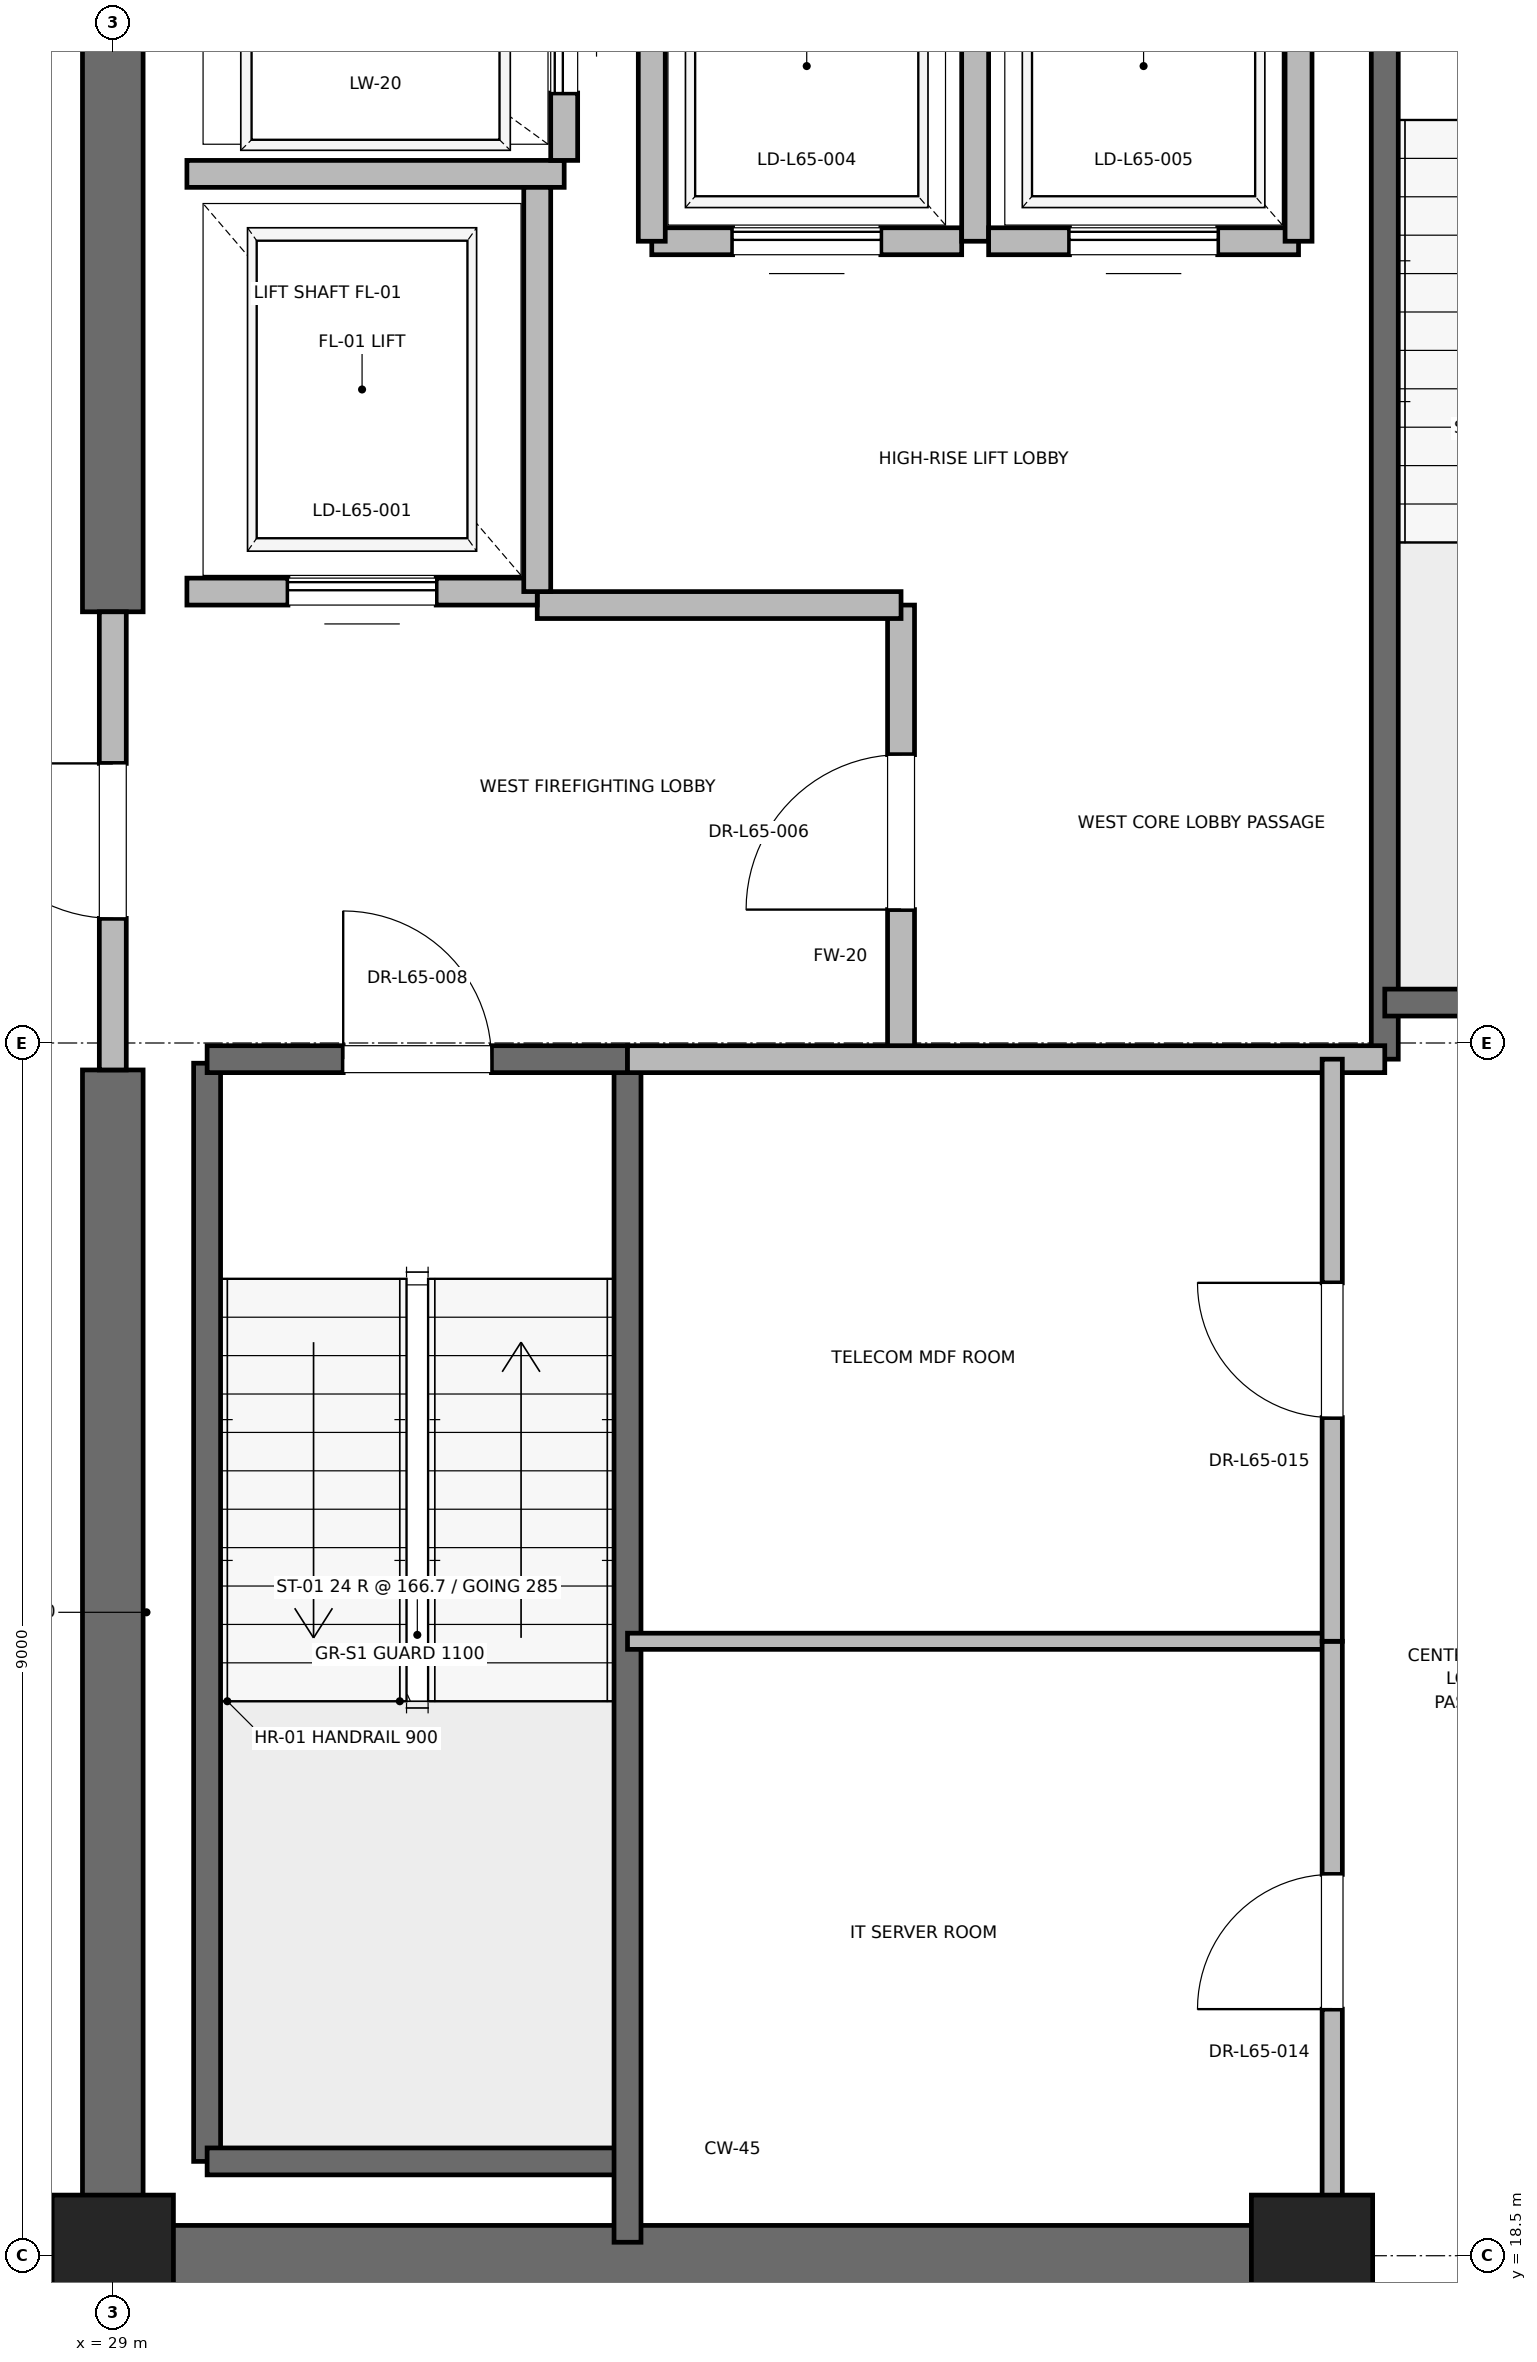
"""IFC4 building model, lengths in metres.
Left out: names, types, materials, properties, quantities, classifications, styles, units other than length and angle.
Written with IfcOpenShell. Run it as: python <this file> out.ifc"""

import sys

from ifc_helpers import new_model, si_unit, direction, frame, frame_2d, origin, origin_2d, place, context, subcontext, project, spatial, rectangle, extrude, element, fill, save


model = new_model("IFC4")
c1 = context("Model", 3, precision=1e-05, world=origin(), true_north=direction((0.0, 1.0)))
c2 = subcontext(c1, "Body", "Model", "MODEL_VIEW")
j1 = project(units=[si_unit("LENGTHUNIT", "METRE"), si_unit("PLANEANGLEUNIT", "RADIAN")], contexts=[c1])
p1 = place(None, origin())
s1 = spatial("IfcSite", under=j1, at=p1, CompositionType="ELEMENT")
p2 = place(p1, origin())
s2 = spatial("IfcBuilding", under=s1, at=p2, CompositionType="ELEMENT")
p3 = place(p2, frame((0.0, 0.0, 279.2)))
s3 = spatial("IfcBuildingStorey", under=s2, at=p3, CompositionType="ELEMENT", Elevation=279.2)
for number, where, z_axis, x_axis in (
    (1, (29.0, 18.5, 0.0), (0.0, 0.0, 1.0), (1.0, 0.0, 0.0)),
    (2, (37.9, 18.5, 0.0), (0.0, 0.0, 1.0), (1.0, 0.0, 0.0)),
):
    element("IfcColumn", number, at=place(p3, frame(where, z_axis=z_axis, x_axis=x_axis)), inside=s3, PredefinedType="PILASTER", context=c2, shape_type="SweptSolid", body=[
        extrude(rectangle(XDim=0.9, YDim=0.9, at=origin_2d()), origin(), (0.0, 0.0, 1.0), 4.0),
    ])
p4 = place(p3, frame((29.0, 18.5, 0.0), z_axis=(0.0, 0.0, 1.0), x_axis=(1.0, 0.0, 0.0)))
e3 = element("IfcWall", 3, at=p4, inside=s3, PredefinedType="SHEAR", context=c2, shape_type="SweptSolid", body=[
    extrude(rectangle(XDim=9.2, YDim=0.45, at=frame_2d((4.6, 0.0))), origin(), (0.0, 0.0, 1.0), 3.785),
])
p5 = place(p3, frame((29.0, 18.5, 0.0), z_axis=(0.0, 0.0, 1.0), x_axis=(0.0, 1.0, 0.0)))
e4 = element("IfcWall", 4, at=p5, inside=s3, PredefinedType="SHEAR", context=c2, shape_type="SweptSolid", body=[
    extrude(rectangle(XDim=8.8, YDim=0.45, at=frame_2d((4.4, 0.0))), origin(), (0.0, 0.0, 1.0), 3.785),
])
p6 = place(p3, frame((29.0, 30.7, 0.0), z_axis=(0.0, 0.0, 1.0), x_axis=(0.0, 1.0, 0.0)))
e5 = element("IfcWall", 5, at=p6, inside=s3, PredefinedType="SHEAR", context=c2, shape_type="SweptSolid", body=[
    extrude(rectangle(XDim=5.8, YDim=0.45, at=frame_2d((2.9, 0.0))), origin(), (0.0, 0.0, 1.0), 3.785),
])
p7 = place(p3, frame((29.7, 19.2, 0.0), z_axis=(0.0, 0.0, 1.0), x_axis=(0.0, 1.0, 0.0)))
e6 = element("IfcWall", 6, at=p7, inside=s3, PredefinedType="SOLIDWALL", context=c2, shape_type="SweptSolid", body=[
    extrude(rectangle(XDim=8.15, YDim=0.2, at=frame_2d((4.075, 0.0))), origin(), (0.0, 0.0, 1.0), 3.785),
])
p8 = place(p3, frame((29.7, 19.2, 0.0), z_axis=(0.0, 0.0, 1.0), x_axis=(1.0, 0.0, 0.0)))
e7 = element("IfcWall", 7, at=p8, inside=s3, PredefinedType="SOLIDWALL", context=c2, shape_type="SweptSolid", body=[
    extrude(rectangle(XDim=3.12, YDim=0.2, at=frame_2d((1.56, 0.0))), origin(), (0.0, 0.0, 1.0), 3.785),
])
p9 = place(p3, frame((32.82, 18.6, 0.0), z_axis=(0.0, 0.0, 1.0), x_axis=(0.0, 1.0, 0.0)))
e8 = element("IfcWall", 8, at=p9, inside=s3, PredefinedType="SOLIDWALL", context=c2, shape_type="SweptSolid", body=[
    extrude(rectangle(XDim=8.78, YDim=0.2, at=frame_2d((4.39, 0.0))), origin(), (0.0, 0.0, 1.0), 3.785),
])
p10 = place(p3, frame((29.7, 27.38, 0.0), z_axis=(0.0, 0.0, 1.0), x_axis=(1.0, 0.0, 0.0)))
e9 = element("IfcWall", 9, at=p10, inside=s3, PredefinedType="SOLIDWALL", context=c2, shape_type="SweptSolid", body=[
    extrude(rectangle(XDim=3.12, YDim=0.2, at=frame_2d((1.56, 0.0))), origin(), (0.0, 0.0, 1.0), 3.785),
])
p11 = place(p10, frame((1.01, 0.0, 0.0)))
e10 = element("IfcOpeningElement", 10, at=p11, cuts=e9, PredefinedType="OPENING", context=c2, shape_type="SweptSolid", body=[
    extrude(rectangle(XDim=1.1, YDim=2.15, at=frame_2d((0.55, 1.075))), frame((0.0, 0.1, 0.0), z_axis=(0.0, -1.0, 0.0), x_axis=(1.0, 0.0, 0.0)), (0.0, 0.0, 1.0), 0.2),
])
p12 = place(p3, frame((38.44, 27.38, 0.0), z_axis=(0.0, 0.0, 1.0), x_axis=(0.0, 1.0, 0.0)))
e11 = element("IfcWall", 11, at=p12, inside=s3, PredefinedType="SOLIDWALL", context=c2, shape_type="SweptSolid", body=[
    extrude(rectangle(XDim=8.87, YDim=0.2, at=frame_2d((4.435, 0.0))), origin(), (0.0, 0.0, 1.0), 3.785),
])
p13 = place(p3, frame((38.44, 27.8, 0.0), z_axis=(0.0, 0.0, 1.0), x_axis=(1.0, 0.0, 0.0)))
e12 = element("IfcWall", 12, at=p13, inside=s3, PredefinedType="SOLIDWALL", context=c2, shape_type="SweptSolid", body=[
    extrude(rectangle(XDim=3.32, YDim=0.2, at=frame_2d((1.66, 0.0))), origin(), (0.0, 0.0, 1.0), 3.785),
])
p14 = place(p3, frame((34.85, 27.38, 0.0), z_axis=(0.0, 0.0, 1.0), x_axis=(0.0, 1.0, 0.0)))
e13 = element("IfcWall", 13, at=p14, inside=s3, PredefinedType="PARTITIONING", context=c2, shape_type="SweptSolid", body=[
    extrude(rectangle(XDim=3.37, YDim=0.2, at=frame_2d((1.685, 0.0))), origin(), (0.0, 0.0, 1.0), 3.785),
])
p15 = place(p14, frame((1.11, 0.0, 0.0)))
e14 = element("IfcOpeningElement", 14, at=p15, cuts=e13, PredefinedType="OPENING", context=c2, shape_type="SweptSolid", body=[
    extrude(rectangle(XDim=1.15, YDim=2.2, at=frame_2d((0.575, 1.1))), frame((0.0, 0.1, 0.0), z_axis=(0.0, -1.0, 0.0), x_axis=(1.0, 0.0, 0.0)), (0.0, 0.0, 1.0), 0.2),
])
p16 = place(p3, frame((29.0, 27.3, 0.0), z_axis=(0.0, 0.0, 1.0), x_axis=(0.0, 1.0, 0.0)))
e15 = element("IfcWall", 15, at=p16, inside=s3, PredefinedType="PARTITIONING", context=c2, shape_type="SweptSolid", body=[
    extrude(rectangle(XDim=3.4, YDim=0.2, at=frame_2d((1.7, 0.0))), origin(), (0.0, 0.0, 1.0), 2.865),
])
p17 = place(p16, frame((1.125, 0.0, 0.0)))
e16 = element("IfcOpeningElement", 16, at=p17, cuts=e15, PredefinedType="OPENING", context=c2, shape_type="SweptSolid", body=[
    extrude(rectangle(XDim=1.15, YDim=2.2, at=frame_2d((0.575, 1.1))), frame((0.0, 0.1, 0.0), z_axis=(0.0, -1.0, 0.0), x_axis=(1.0, 0.0, 0.0)), (0.0, 0.0, 1.0), 0.2),
])
p18 = place(p3, frame((32.82, 27.38, 0.0), z_axis=(0.0, 0.0, 1.0), x_axis=(1.0, 0.0, 0.0)))
e17 = element("IfcWall", 17, at=p18, inside=s3, PredefinedType="PARTITIONING", context=c2, shape_type="SweptSolid", body=[
    extrude(rectangle(XDim=5.62, YDim=0.2, at=frame_2d((2.81, 0.0))), origin(), (0.0, 0.0, 1.0), 3.785),
])
p19 = place(p3, frame((32.15, 30.75, 0.0), z_axis=(0.0, 0.0, 1.0), x_axis=(1.0, 0.0, 0.0)))
e18 = element("IfcWall", 18, at=p19, inside=s3, PredefinedType="PARTITIONING", context=c2, shape_type="SweptSolid", body=[
    extrude(rectangle(XDim=2.7, YDim=0.2, at=frame_2d((1.35, 0.0))), origin(), (0.0, 0.0, 1.0), 3.785),
])
p20 = place(p3, frame((29.55, 30.85, 0.0), z_axis=(0.0, 0.0, 1.0), x_axis=(1.0, 0.0, 0.0)))
e19 = element("IfcWall", 19, at=p20, inside=s3, PredefinedType="SOLIDWALL", context=c2, shape_type="SweptSolid", body=[
    extrude(rectangle(XDim=2.6, YDim=0.2, at=frame_2d((1.3, 0.0))), origin(), (0.0, 0.0, 1.0), 2.865),
])
p21 = place(p20, frame((0.75, 0.0, 0.0)))
e20 = element("IfcOpeningElement", 20, at=p21, cuts=e19, PredefinedType="OPENING", context=c2, shape_type="SweptSolid", body=[
    extrude(rectangle(XDim=1.1, YDim=2.2, at=frame_2d((0.55, 1.1))), frame((0.0, 0.1, 0.0), z_axis=(0.0, -1.0, 0.0), x_axis=(1.0, 0.0, 0.0)), (0.0, 0.0, 1.0), 0.2),
])
p22 = place(p3, frame((29.55, 33.95, 0.0), z_axis=(0.0, 0.0, 1.0), x_axis=(1.0, 0.0, 0.0)))
e21 = element("IfcWall", 21, at=p22, inside=s3, PredefinedType="SOLIDWALL", context=c2, shape_type="SweptSolid", body=[
    extrude(rectangle(XDim=2.8, YDim=0.2, at=frame_2d((1.4, 0.0))), origin(), (0.0, 0.0, 1.0), 3.785),
])
p23 = place(p3, frame((32.15, 30.85, 0.0), z_axis=(0.0, 0.0, 1.0), x_axis=(0.0, 1.0, 0.0)))
e22 = element("IfcWall", 22, at=p23, inside=s3, PredefinedType="SOLIDWALL", context=c2, shape_type="SweptSolid", body=[
    extrude(rectangle(XDim=3.0, YDim=0.2, at=frame_2d((1.5, 0.0))), origin(), (0.0, 0.0, 1.0), 3.785),
])
p24 = place(p3, frame((32.35, 34.05, 0.0), z_axis=(0.0, 0.0, 1.0), x_axis=(0.0, 1.0, 0.0)))
e23 = element("IfcWall", 23, at=p24, inside=s3, PredefinedType="SOLIDWALL", context=c2, shape_type="SweptSolid", body=[
    extrude(rectangle(XDim=2.1, YDim=0.2, at=frame_2d((1.05, 0.0))), origin(), (0.0, 0.0, 1.0), 3.785),
])
p25 = place(p24, frame((0.5, 0.0, 0.0)))
e24 = element("IfcOpeningElement", 24, at=p25, cuts=e23, PredefinedType="OPENING", context=c2, shape_type="SweptSolid", body=[
    extrude(rectangle(XDim=1.1, YDim=2.2, at=frame_2d((0.55, 1.1))), frame((0.0, 0.1, 0.0), z_axis=(0.0, -1.0, 0.0), x_axis=(1.0, 0.0, 0.0)), (0.0, 0.0, 1.0), 0.2),
])
p26 = place(p3, frame((33.0, 33.45, 0.0), z_axis=(0.0, 0.0, 1.0), x_axis=(1.0, 0.0, 0.0)))
e25 = element("IfcWall", 25, at=p26, inside=s3, PredefinedType="SOLIDWALL", context=c2, shape_type="SweptSolid", body=[
    extrude(rectangle(XDim=2.3, YDim=0.2, at=frame_2d((1.15, 0.0))), origin(), (0.0, 0.0, 1.0), 3.785),
])
p27 = place(p26, frame((0.6, 0.0, 0.0)))
e26 = element("IfcOpeningElement", 26, at=p27, cuts=e25, PredefinedType="OPENING", context=c2, shape_type="SweptSolid", body=[
    extrude(rectangle(XDim=1.1, YDim=2.2, at=frame_2d((0.55, 1.1))), frame((0.0, 0.1, 0.0), z_axis=(0.0, -1.0, 0.0), x_axis=(1.0, 0.0, 0.0)), (0.0, 0.0, 1.0), 0.2),
])
p28 = place(p3, frame((33.0, 36.05, 0.0), z_axis=(0.0, 0.0, 1.0), x_axis=(0.0, -1.0, 0.0)))
e27 = element("IfcWall", 27, at=p28, inside=s3, PredefinedType="SOLIDWALL", context=c2, shape_type="SweptSolid", body=[
    extrude(rectangle(XDim=2.6, YDim=0.2, at=frame_2d((1.3, 0.0))), origin(), (0.0, 0.0, 1.0), 3.785),
])
p29 = place(p3, frame((35.4, 33.45, 0.0), z_axis=(0.0, 0.0, 1.0), x_axis=(0.0, 1.0, 0.0)))
e28 = element("IfcWall", 28, at=p29, inside=s3, PredefinedType="SOLIDWALL", context=c2, shape_type="SweptSolid", body=[
    extrude(rectangle(XDim=2.6, YDim=0.2, at=frame_2d((1.3, 0.0))), origin(), (0.0, 0.0, 1.0), 2.865),
])
p30 = place(p3, frame((35.5, 33.45, 0.0), z_axis=(0.0, 0.0, 1.0), x_axis=(1.0, 0.0, 0.0)))
e29 = element("IfcWall", 29, at=p30, inside=s3, PredefinedType="SOLIDWALL", context=c2, shape_type="SweptSolid", body=[
    extrude(rectangle(XDim=2.3, YDim=0.2, at=frame_2d((1.15, 0.0))), origin(), (0.0, 0.0, 1.0), 3.785),
])
p31 = place(p30, frame((0.6, 0.0, 0.0)))
e30 = element("IfcOpeningElement", 30, at=p31, cuts=e29, PredefinedType="OPENING", context=c2, shape_type="SweptSolid", body=[
    extrude(rectangle(XDim=1.1, YDim=2.2, at=frame_2d((0.55, 1.1))), frame((0.0, 0.1, 0.0), z_axis=(0.0, -1.0, 0.0), x_axis=(1.0, 0.0, 0.0)), (0.0, 0.0, 1.0), 0.2),
])
p32 = place(p3, frame((37.8, 33.45, 0.0), z_axis=(0.0, 0.0, 1.0), x_axis=(0.0, 1.0, 0.0)))
e31 = element("IfcWall", 31, at=p32, inside=s3, PredefinedType="SOLIDWALL", context=c2, shape_type="SweptSolid", body=[
    extrude(rectangle(XDim=2.6, YDim=0.2, at=frame_2d((1.3, 0.0))), origin(), (0.0, 0.0, 1.0), 2.865),
])
p33 = place(p3, frame((32.82, 23.06, 0.0), z_axis=(0.0, 0.0, 1.0), x_axis=(1.0, 0.0, 0.0)))
e32 = element("IfcWall", 32, at=p33, inside=s3, PredefinedType="PARTITIONING", context=c2, shape_type="SweptSolid", body=[
    extrude(rectangle(XDim=5.23, YDim=0.12, at=frame_2d((2.615, 0.0))), origin(), (0.0, 0.0, 1.0), 2.85),
])
p34 = place(p3, frame((38.05, 18.6, 0.0), z_axis=(0.0, 0.0, 1.0), x_axis=(0.0, 1.0, 0.0)))
e33 = element("IfcWall", 33, at=p34, inside=s3, PredefinedType="PARTITIONING", context=c2, shape_type="SweptSolid", body=[
    extrude(rectangle(XDim=4.46, YDim=0.15, at=frame_2d((2.23, 0.0))), origin(), (0.0, 0.0, 1.0), 2.85),
])
p35 = place(p34, frame((1.73, 0.0, 0.0)))
e34 = element("IfcOpeningElement", 34, at=p35, cuts=e33, PredefinedType="OPENING", context=c2, shape_type="SweptSolid", body=[
    extrude(rectangle(XDim=1.0, YDim=2.15, at=frame_2d((0.5, 1.075))), frame((0.0, 0.075, 0.0), z_axis=(0.0, -1.0, 0.0), x_axis=(1.0, 0.0, 0.0)), (0.0, 0.0, 1.0), 0.15),
])
p36 = place(p3, frame((38.05, 23.06, 0.0), z_axis=(0.0, 0.0, 1.0), x_axis=(0.0, 1.0, 0.0)))
e35 = element("IfcWall", 35, at=p36, inside=s3, PredefinedType="PARTITIONING", context=c2, shape_type="SweptSolid", body=[
    extrude(rectangle(XDim=4.32, YDim=0.15, at=frame_2d((2.16, 0.0))), origin(), (0.0, 0.0, 1.0), 2.85),
])
p37 = place(p36, frame((1.66, 0.0, 0.0)))
e36 = element("IfcOpeningElement", 36, at=p37, cuts=e35, PredefinedType="OPENING", context=c2, shape_type="SweptSolid", body=[
    extrude(rectangle(XDim=1.0, YDim=2.15, at=frame_2d((0.5, 1.075))), frame((0.0, 0.075, 0.0), z_axis=(0.0, -1.0, 0.0), x_axis=(1.0, 0.0, 0.0)), (0.0, 0.0, 1.0), 0.15),
])
p38 = place(p11, origin())
e37 = element("IfcDoor", 37, at=p38, inside=s3, OperationType="SINGLE_SWING_LEFT", PredefinedType="DOOR", context=c2, shape_type="SweptSolid", body=[
    extrude(rectangle(XDim=1.1, YDim=2.15, at=frame_2d((0.55, 1.075))), frame((0.0, 0.025, 0.0), z_axis=(0.0, -1.0, 0.0), x_axis=(1.0, 0.0, 0.0)), (0.0, 0.0, 1.0), 0.05),
])
fill(e10, e37)
p39 = place(p15, origin())
e38 = element("IfcDoor", 38, at=p39, inside=s3, OperationType="SINGLE_SWING_LEFT", PredefinedType="DOOR", context=c2, shape_type="SweptSolid", body=[
    extrude(rectangle(XDim=1.15, YDim=2.2, at=frame_2d((0.575, 1.1))), frame((0.0, 0.025, 0.0), z_axis=(0.0, -1.0, 0.0), x_axis=(1.0, 0.0, 0.0)), (0.0, 0.0, 1.0), 0.05),
])
fill(e14, e38)
p40 = place(p17, origin())
e39 = element("IfcDoor", 39, at=p40, inside=s3, OperationType="SINGLE_SWING_RIGHT", PredefinedType="DOOR", context=c2, shape_type="SweptSolid", body=[
    extrude(rectangle(XDim=1.15, YDim=2.2, at=frame_2d((0.575, 1.1))), frame((0.0, 0.025, 0.0), z_axis=(0.0, -1.0, 0.0), x_axis=(1.0, 0.0, 0.0)), (0.0, 0.0, 1.0), 0.05),
])
fill(e16, e39)
p41 = place(p21, origin())
e40 = element("IfcDoor", 40, at=p41, inside=s3, OperationType="SLIDING_TO_RIGHT", PredefinedType="DOOR", context=c2, shape_type="SweptSolid", body=[
    extrude(rectangle(XDim=1.1, YDim=2.2, at=frame_2d((0.55, 1.1))), frame((0.0, 0.025, 0.0), z_axis=(0.0, -1.0, 0.0), x_axis=(1.0, 0.0, 0.0)), (0.0, 0.0, 1.0), 0.05),
])
fill(e20, e40)
p42 = place(p25, origin())
e41 = element("IfcDoor", 41, at=p42, inside=s3, OperationType="SLIDING_TO_RIGHT", PredefinedType="DOOR", context=c2, shape_type="SweptSolid", body=[
    extrude(rectangle(XDim=1.1, YDim=2.2, at=frame_2d((0.55, 1.1))), frame((0.0, 0.025, 0.0), z_axis=(0.0, -1.0, 0.0), x_axis=(1.0, 0.0, 0.0)), (0.0, 0.0, 1.0), 0.05),
])
fill(e24, e41)
p43 = place(p27, origin())
e42 = element("IfcDoor", 42, at=p43, inside=s3, OperationType="SLIDING_TO_RIGHT", PredefinedType="DOOR", context=c2, shape_type="SweptSolid", body=[
    extrude(rectangle(XDim=1.1, YDim=2.2, at=frame_2d((0.55, 1.1))), frame((0.0, 0.025, 0.0), z_axis=(0.0, -1.0, 0.0), x_axis=(1.0, 0.0, 0.0)), (0.0, 0.0, 1.0), 0.05),
])
fill(e26, e42)
p44 = place(p31, origin())
e43 = element("IfcDoor", 43, at=p44, inside=s3, OperationType="SLIDING_TO_RIGHT", PredefinedType="DOOR", context=c2, shape_type="SweptSolid", body=[
    extrude(rectangle(XDim=1.1, YDim=2.2, at=frame_2d((0.55, 1.1))), frame((0.0, 0.025, 0.0), z_axis=(0.0, -1.0, 0.0), x_axis=(1.0, 0.0, 0.0)), (0.0, 0.0, 1.0), 0.05),
])
fill(e30, e43)
p45 = place(p35, origin())
e44 = element("IfcDoor", 44, at=p45, inside=s3, OperationType="SINGLE_SWING_LEFT", PredefinedType="DOOR", context=c2, shape_type="SweptSolid", body=[
    extrude(rectangle(XDim=1.0, YDim=2.15, at=frame_2d((0.5, 1.075))), frame((0.0, 0.025, 0.0), z_axis=(0.0, -1.0, 0.0), x_axis=(1.0, 0.0, 0.0)), (0.0, 0.0, 1.0), 0.05),
])
fill(e34, e44)
p46 = place(p37, origin())
e45 = element("IfcDoor", 45, at=p46, inside=s3, OperationType="SINGLE_SWING_RIGHT", PredefinedType="DOOR", context=c2, shape_type="SweptSolid", body=[
    extrude(rectangle(XDim=1.0, YDim=2.15, at=frame_2d((0.5, 1.075))), frame((0.0, 0.025, 0.0), z_axis=(0.0, -1.0, 0.0), x_axis=(1.0, 0.0, 0.0)), (0.0, 0.0, 1.0), 0.05),
])
fill(e36, e45)
save(model, sys.argv[1])
